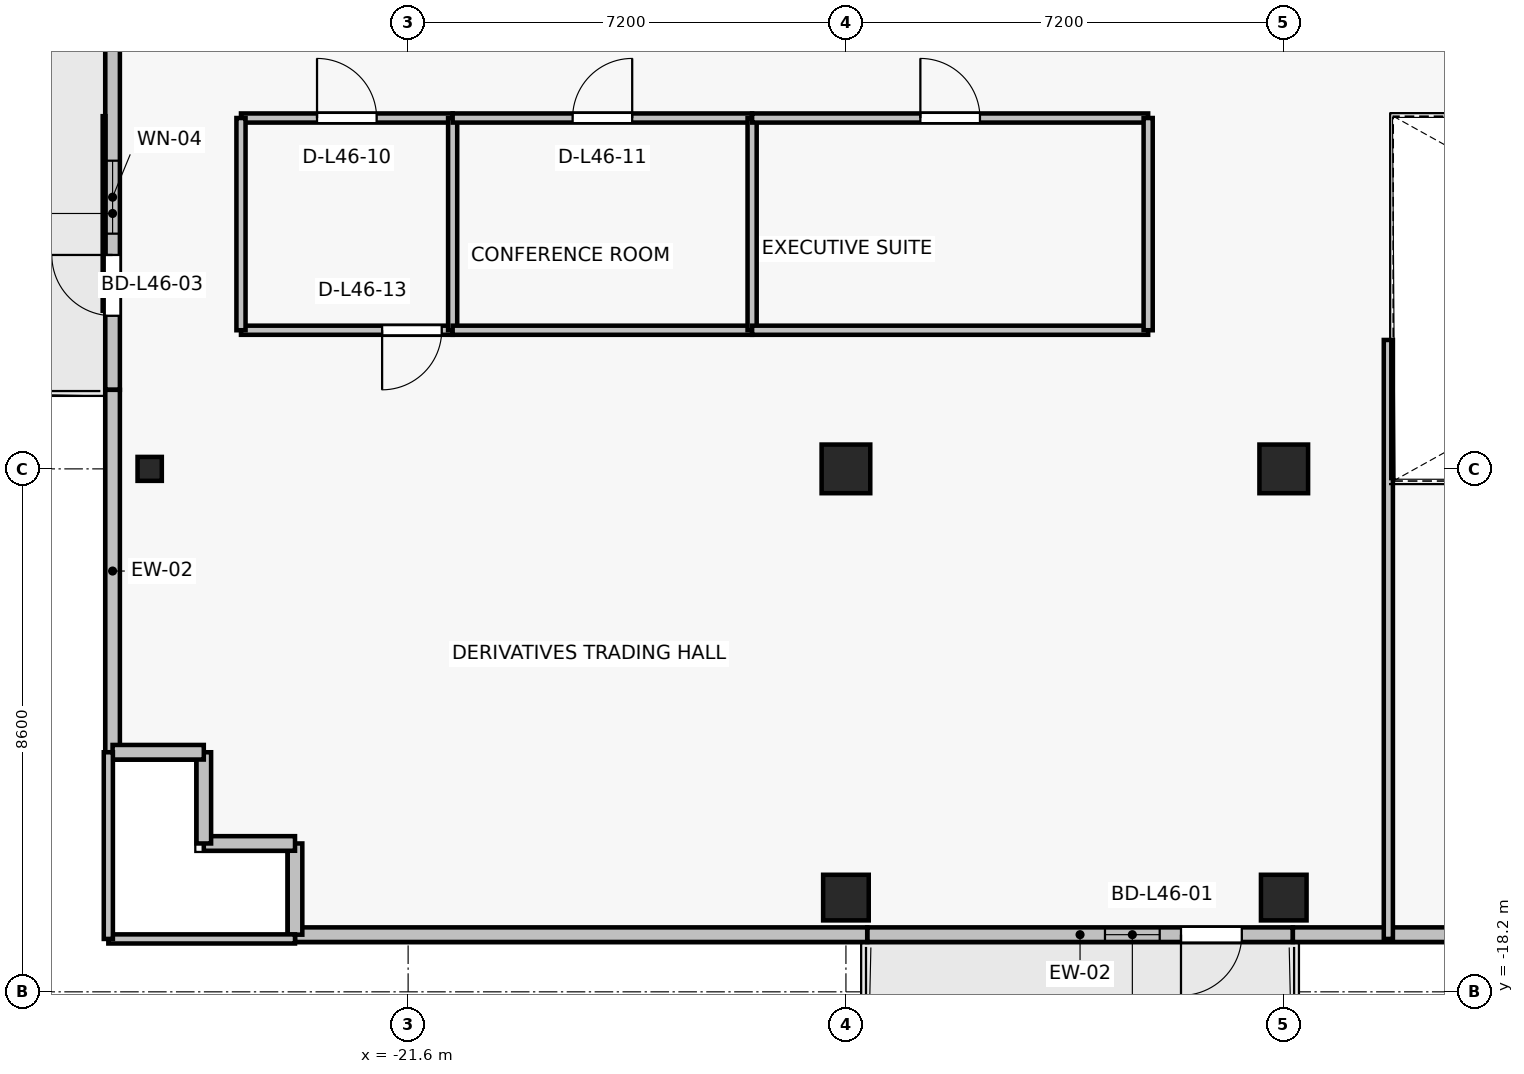
"""IFC4 building model, lengths in metres.
Left out: names, types, materials, properties, quantities, classifications, styles, units other than length and angle.
Written with IfcOpenShell. Run it as: python <this file> out.ifc"""

import sys

from ifc_helpers import new_model, si_unit, direction, frame, frame_2d, origin, origin_2d, place, context, subcontext, project, spatial, rectangle, i_section, extrude, source, transform, mapped, element, fill, save


model = new_model("IFC4")
c1 = context("Model", 3, precision=1e-05, world=origin(), true_north=direction((0.0, 1.0)))
c2 = subcontext(c1, "Body", "Model", "MODEL_VIEW")
j1 = project(units=[si_unit("LENGTHUNIT", "METRE"), si_unit("PLANEANGLEUNIT", "RADIAN")], contexts=[c1])
p1 = place(None, origin())
s1 = spatial("IfcSite", under=j1, at=p1, CompositionType="ELEMENT")
p2 = place(p1, origin())
s2 = spatial("IfcBuilding", under=s1, at=p2, CompositionType="ELEMENT")
p3 = place(p2, frame((0.0, 0.0, 166.0)))
s3 = spatial("IfcBuildingStorey", under=s2, at=p3, CompositionType="ELEMENT", Elevation=166.0)
for number, where, z_axis, x_axis in (
    (1, (-14.4, -9.6, 0.0), (0.0, 0.0, 1.0), (1.0, 0.0, 0.0)),
    (2, (-7.2, -9.6, 0.0), (0.0, 0.0, 1.0), (1.0, 0.0, 0.0)),
):
    element("IfcColumn", number, at=place(p3, frame(where, z_axis=z_axis, x_axis=x_axis)), inside=s3, PredefinedType="COLUMN", context=c2, shape_type="SweptSolid", body=[
        extrude(rectangle(XDim=0.8, YDim=0.8, at=origin_2d()), origin(), (0.0, 0.0, 1.0), 3.3),
    ])
for number, where, z_axis, x_axis in (
    (3, (-14.4, -16.65, 0.0), (0.0, 0.0, 1.0), (1.0, 0.0, 0.0)),
    (4, (-7.2, -16.65, 0.0), (0.0, 0.0, 1.0), (1.0, 0.0, 0.0)),
):
    element("IfcColumn", number, at=place(p3, frame(where, z_axis=z_axis, x_axis=x_axis)), inside=s3, PredefinedType="COLUMN", context=c2, shape_type="SweptSolid", body=[
        extrude(rectangle(XDim=0.75, YDim=0.75, at=origin_2d()), origin(), (0.0, 0.0, 1.0), 3.3),
    ])
p4 = place(p3, frame((-25.85, -9.6, 0.0), z_axis=(0.0, 0.0, 1.0), x_axis=(1.0, 0.0, 0.0)))
e5 = element("IfcColumn", 5, at=p4, inside=s3, PredefinedType="COLUMN", context=c2, shape_type="SweptSolid", body=[
    extrude(i_section(OverallWidth=0.399, OverallDepth=0.394, WebThickness=0.023, FlangeThickness=0.037, FilletRadius=0.015, at=origin_2d()), origin(), (0.0, 0.0, 1.0), 3.3),
])
p5 = place(p3, frame((-7.05, -17.26, 0.0), z_axis=(0.0, 0.0, 1.0), x_axis=(-1.0, 0.0, 0.0)))
e6 = element("IfcWall", 6, at=p5, inside=s3, PredefinedType="SOLIDWALL", context=c2, shape_type="SweptSolid", body=[
    extrude(rectangle(XDim=7.0, YDim=0.24, at=frame_2d((3.5, 0.0))), origin(), (0.0, 0.0, 1.0), 2.665),
])
p6 = place(p5, frame((0.84, 0.0, 0.0)))
e7 = element("IfcOpeningElement", 7, at=p6, cuts=e6, PredefinedType="OPENING", context=c2, shape_type="SweptSolid", body=[
    extrude(rectangle(XDim=1.0, YDim=2.2, at=frame_2d((0.5, 1.1))), frame((0.0, 0.13, 0.0), z_axis=(0.0, -1.0, 0.0), x_axis=(1.0, 0.0, 0.0)), (0.0, 0.0, 1.0), 0.26),
])
p7 = place(p5, frame((2.19, 0.0, 0.85)))
e8 = element("IfcOpeningElement", 8, at=p7, cuts=e6, PredefinedType="OPENING", context=c2, shape_type="SweptSolid", body=[
    extrude(rectangle(XDim=0.9, YDim=1.35, at=frame_2d((0.45, 0.675))), frame((0.0, 0.13, 0.0), z_axis=(0.0, -1.0, 0.0), x_axis=(1.0, 0.0, 0.0)), (0.0, 0.0, 1.0), 0.26),
])
p8 = place(p3, frame((-26.46, -8.3, 0.0), z_axis=(0.0, 0.0, 1.0), x_axis=(0.0, 1.0, 0.0)))
e9 = element("IfcWall", 9, at=p8, inside=s3, PredefinedType="SOLIDWALL", context=c2, shape_type="SweptSolid", body=[
    extrude(rectangle(XDim=5.8, YDim=0.24, at=frame_2d((2.9, 0.0))), origin(), (0.0, 0.0, 1.0), 3.075),
])
p9 = place(p8, frame((1.218, 0.0, 0.0)))
e10 = element("IfcOpeningElement", 10, at=p9, cuts=e9, PredefinedType="OPENING", context=c2, shape_type="SweptSolid", body=[
    extrude(rectangle(XDim=1.0, YDim=2.2, at=frame_2d((0.5, 1.1))), frame((0.0, 0.13, 0.0), z_axis=(0.0, -1.0, 0.0), x_axis=(1.0, 0.0, 0.0)), (0.0, 0.0, 1.0), 0.26),
])
p10 = place(p8, frame((2.568, 0.0, 0.85)))
e11 = element("IfcOpeningElement", 11, at=p10, cuts=e9, PredefinedType="OPENING", context=c2, shape_type="SweptSolid", body=[
    extrude(rectangle(XDim=1.2, YDim=1.5, at=frame_2d((0.6, 0.75))), frame((0.0, 0.13, 0.0), z_axis=(0.0, -1.0, 0.0), x_axis=(1.0, 0.0, 0.0)), (0.0, 0.0, 1.0), 0.26),
])
p11 = place(p3, frame((-26.46, -8.3, 0.0), z_axis=(0.0, 0.0, 1.0), x_axis=(0.0, -1.0, 0.0)))
e12 = element("IfcWall", 12, at=p11, inside=s3, PredefinedType="SOLIDWALL", context=c2, shape_type="SweptSolid", body=[
    extrude(rectangle(XDim=5.96, YDim=0.24, at=frame_2d((2.98, 0.0))), origin(), (0.0, 0.0, 1.0), 3.075),
])
p12 = place(p3, frame((-7.05, -17.26, 0.0), z_axis=(0.0, 0.0, 1.0), x_axis=(1.0, 0.0, 0.0)))
e13 = element("IfcWall", 13, at=p12, inside=s3, PredefinedType="SOLIDWALL", context=c2, shape_type="SweptSolid", body=[
    extrude(rectangle(XDim=3.85, YDim=0.24, at=frame_2d((1.925, 0.0))), origin(), (0.0, 0.0, 1.0), 3.075),
])
p13 = place(p3, frame((-23.46, -17.26, 0.0), z_axis=(0.0, 0.0, 1.0), x_axis=(1.0, 0.0, 0.0)))
e14 = element("IfcWall", 14, at=p13, inside=s3, PredefinedType="SOLIDWALL", context=c2, shape_type="SweptSolid", body=[
    extrude(rectangle(XDim=9.41, YDim=0.24, at=frame_2d((4.705, 0.0))), origin(), (0.0, 0.0, 1.0), 3.075),
])
for number, where, z_axis, x_axis in (
    (15, (-23.46, -15.76, 0.0), (0.0, 0.0, 1.0), (0.0, -1.0, 0.0)),
    (16, (-24.96, -15.76, 0.0), (0.0, 0.0, 1.0), (1.0, 0.0, 0.0)),
    (17, (-24.96, -14.26, 0.0), (0.0, 0.0, 1.0), (0.0, -1.0, 0.0)),
    (18, (-26.46, -14.26, 0.0), (0.0, 0.0, 1.0), (1.0, 0.0, 0.0)),
):
    element("IfcWall", number, at=place(p3, frame(where, z_axis=z_axis, x_axis=x_axis)), inside=s3, PredefinedType="SOLIDWALL", context=c2, shape_type="SweptSolid", body=[
        extrude(rectangle(XDim=1.5, YDim=0.24, at=frame_2d((0.75, 0.0))), origin(), (0.0, 0.0, 1.0), 3.075),
    ])
p14 = place(p3, frame((-20.868, -7.32, 0.0), z_axis=(0.0, 0.0, 1.0), x_axis=(-1.0, 0.0, 0.0)))
e19 = element("IfcWall", 19, at=p14, inside=s3, PredefinedType="PARTITIONING", context=c2, shape_type="SweptSolid", body=[
    extrude(rectangle(XDim=3.481, YDim=0.15, at=frame_2d((1.74, 0.0))), origin(), (0.0, 0.0, 1.0), 3.075),
])
p15 = place(p14, frame((0.18, 0.0, 0.0)))
e20 = element("IfcOpeningElement", 20, at=p15, cuts=e19, PredefinedType="OPENING", context=c2, shape_type="SweptSolid", body=[
    extrude(rectangle(XDim=0.98, YDim=2.15, at=frame_2d((0.49, 1.075))), frame((0.0, 0.085, 0.0), z_axis=(0.0, -1.0, 0.0), x_axis=(1.0, 0.0, 0.0)), (0.0, 0.0, 1.0), 0.17),
])
p16 = place(p3, frame((-24.349, -3.83, 0.0), z_axis=(0.0, 0.0, 1.0), x_axis=(1.0, 0.0, 0.0)))
e21 = element("IfcWall", 21, at=p16, inside=s3, PredefinedType="PARTITIONING", context=c2, shape_type="SweptSolid", body=[
    extrude(rectangle(XDim=3.481, YDim=0.15, at=frame_2d((1.74, 0.0))), origin(), (0.0, 0.0, 1.0), 3.075),
])
p17 = place(p16, frame((1.25, 0.0, 0.0)))
e22 = element("IfcOpeningElement", 22, at=p17, cuts=e21, PredefinedType="OPENING", context=c2, shape_type="SweptSolid", body=[
    extrude(rectangle(XDim=0.98, YDim=2.15, at=frame_2d((0.49, 1.075))), frame((0.0, 0.085, 0.0), z_axis=(0.0, -1.0, 0.0), x_axis=(1.0, 0.0, 0.0)), (0.0, 0.0, 1.0), 0.17),
])
for number, where, z_axis, x_axis in (
    (23, (-24.349, -7.32, 0.0), (0.0, 0.0, 1.0), (0.0, 1.0, 0.0)),
    (24, (-20.868, -3.83, 0.0), (0.0, 0.0, 1.0), (0.0, -1.0, 0.0)),
):
    element("IfcWall", number, at=place(p3, frame(where, z_axis=z_axis, x_axis=x_axis)), inside=s3, PredefinedType="PARTITIONING", context=c2, shape_type="SweptSolid", body=[
        extrude(rectangle(XDim=3.49, YDim=0.15, at=frame_2d((1.745, 0.0))), origin(), (0.0, 0.0, 1.0), 3.075),
    ])
p18 = place(p3, frame((-15.943, -7.32, 0.0), z_axis=(0.0, 0.0, 1.0), x_axis=(-1.0, 0.0, 0.0)))
e25 = element("IfcWall", 25, at=p18, inside=s3, PredefinedType="PARTITIONING", context=c2, shape_type="SweptSolid", body=[
    extrude(rectangle(XDim=4.925, YDim=0.15, at=frame_2d((2.462, 0.0))), origin(), (0.0, 0.0, 1.0), 3.075),
])
p19 = place(p3, frame((-20.868, -3.83, 0.0), z_axis=(0.0, 0.0, 1.0), x_axis=(1.0, 0.0, 0.0)))
e26 = element("IfcWall", 26, at=p19, inside=s3, PredefinedType="PARTITIONING", context=c2, shape_type="SweptSolid", body=[
    extrude(rectangle(XDim=4.925, YDim=0.15, at=frame_2d((2.462, 0.0))), origin(), (0.0, 0.0, 1.0), 3.075),
])
p20 = place(p19, frame((1.973, 0.0, 0.0)))
e27 = element("IfcOpeningElement", 27, at=p20, cuts=e26, PredefinedType="OPENING", context=c2, shape_type="SweptSolid", body=[
    extrude(rectangle(XDim=0.98, YDim=2.15, at=frame_2d((0.49, 1.075))), frame((0.0, 0.085, 0.0), z_axis=(0.0, -1.0, 0.0), x_axis=(1.0, 0.0, 0.0)), (0.0, 0.0, 1.0), 0.17),
])
p21 = place(p3, frame((-15.943, -3.83, 0.0), z_axis=(0.0, 0.0, 1.0), x_axis=(0.0, -1.0, 0.0)))
e28 = element("IfcWall", 28, at=p21, inside=s3, PredefinedType="PARTITIONING", context=c2, shape_type="SweptSolid", body=[
    extrude(rectangle(XDim=3.49, YDim=0.15, at=frame_2d((1.745, 0.0))), origin(), (0.0, 0.0, 1.0), 3.075),
])
p22 = place(p3, frame((-9.43, -7.32, 0.0), z_axis=(0.0, 0.0, 1.0), x_axis=(-1.0, 0.0, 0.0)))
e29 = element("IfcWall", 29, at=p22, inside=s3, PredefinedType="PARTITIONING", context=c2, shape_type="SweptSolid", body=[
    extrude(rectangle(XDim=6.513, YDim=0.15, at=frame_2d((3.257, 0.0))), origin(), (0.0, 0.0, 1.0), 2.565),
])
p23 = place(p3, frame((-15.943, -3.83, 0.0), z_axis=(0.0, 0.0, 1.0), x_axis=(1.0, 0.0, 0.0)))
e30 = element("IfcWall", 30, at=p23, inside=s3, PredefinedType="PARTITIONING", context=c2, shape_type="SweptSolid", body=[
    extrude(rectangle(XDim=6.513, YDim=0.15, at=frame_2d((3.257, 0.0))), origin(), (0.0, 0.0, 1.0), 2.565),
])
p24 = place(p23, frame((2.767, 0.0, 0.0)))
e31 = element("IfcOpeningElement", 31, at=p24, cuts=e30, PredefinedType="OPENING", context=c2, shape_type="SweptSolid", body=[
    extrude(rectangle(XDim=0.98, YDim=2.15, at=frame_2d((0.49, 1.075))), frame((0.0, 0.085, 0.0), z_axis=(0.0, -1.0, 0.0), x_axis=(1.0, 0.0, 0.0)), (0.0, 0.0, 1.0), 0.17),
])
p25 = place(p3, frame((-9.43, -3.83, 0.0), z_axis=(0.0, 0.0, 1.0), x_axis=(0.0, -1.0, 0.0)))
e32 = element("IfcWall", 32, at=p25, inside=s3, PredefinedType="PARTITIONING", context=c2, shape_type="SweptSolid", body=[
    extrude(rectangle(XDim=3.49, YDim=0.15, at=frame_2d((1.745, 0.0))), origin(), (0.0, 0.0, 1.0), 2.665),
])
p26 = place(p3, frame((-23.46, -17.33, 0.0), z_axis=(0.0, 0.0, 1.0), x_axis=(-1.0, 0.0, 0.0)))
e33 = element("IfcWall", 33, at=p26, inside=s3, PredefinedType="PARTITIONING", context=c2, shape_type="SweptSolid", body=[
    extrude(rectangle(XDim=3.07, YDim=0.15, at=frame_2d((1.535, 0.0))), origin(), (0.0, 0.0, 1.0), 2.665),
])
p27 = place(p3, frame((-26.53, -17.33, 0.0), z_axis=(0.0, 0.0, 1.0), x_axis=(0.0, 1.0, 0.0)))
e34 = element("IfcWall", 34, at=p27, inside=s3, PredefinedType="PARTITIONING", context=c2, shape_type="SweptSolid", body=[
    extrude(rectangle(XDim=3.07, YDim=0.15, at=frame_2d((1.535, 0.0))), origin(), (0.0, 0.0, 1.0), 3.075),
])
p28 = place(p3, frame((-5.48, -7.48, 0.0), z_axis=(0.0, 0.0, 1.0), x_axis=(0.0, -1.0, 0.0)))
e35 = element("IfcWall", 35, at=p28, inside=s3, PredefinedType="PARTITIONING", context=c2, shape_type="SweptSolid", body=[
    extrude(rectangle(XDim=9.85, YDim=0.15, at=frame_2d((4.925, 0.0))), origin(), (0.0, 0.0, 1.0), 2.565),
])
m1 = source(origin(), c2, "Body", "SweptSolid", [
    extrude(rectangle(XDim=1.0, YDim=2.2, at=frame_2d((0.5, 1.1))), frame((0.0, 0.025, 0.0), z_axis=(0.0, -1.0, 0.0), x_axis=(1.0, 0.0, 0.0)), (0.0, 0.0, 1.0), 0.05),
])
p29 = place(p6, origin())
e36 = element("IfcDoor", 36, at=p29, inside=s3, OperationType="SINGLE_SWING_RIGHT", PredefinedType="DOOR", context=c2, shape_type="MappedRepresentation", body=[
    mapped(m1, transform((0.0, 0.0, 0.0), x_axis=(1.0, 0.0, 0.0), y_axis=(0.0, 1.0, 0.0), z_axis=(0.0, 0.0, 1.0), scale=1.0)),
])
fill(e7, e36)
m2 = source(origin(), c2, "Body", "SweptSolid", [
    extrude(rectangle(XDim=0.9, YDim=1.35, at=frame_2d((0.45, 0.675))), frame((0.0, 0.03, 0.0), z_axis=(0.0, -1.0, 0.0), x_axis=(1.0, 0.0, 0.0)), (0.0, 0.0, 1.0), 0.06),
])
p30 = place(p7, origin())
e37 = element("IfcWindow", 37, at=p30, inside=s3, PartitioningType="SINGLE_PANEL", PredefinedType="WINDOW", context=c2, shape_type="MappedRepresentation", body=[
    mapped(m2, transform((0.0, 0.0, 0.0), x_axis=(1.0, 0.0, 0.0), y_axis=(0.0, 1.0, 0.0), z_axis=(0.0, 0.0, 1.0), scale=1.0)),
])
fill(e8, e37)
p31 = place(p9, origin())
e38 = element("IfcDoor", 38, at=p31, inside=s3, OperationType="SINGLE_SWING_RIGHT", PredefinedType="DOOR", context=c2, shape_type="MappedRepresentation", body=[
    mapped(m1, transform((0.0, 0.0, 0.0), x_axis=(1.0, 0.0, 0.0), y_axis=(0.0, 1.0, 0.0), z_axis=(0.0, 0.0, 1.0), scale=1.0)),
])
fill(e10, e38)
m3 = source(origin(), c2, "Body", "SweptSolid", [
    extrude(rectangle(XDim=1.2, YDim=1.5, at=frame_2d((0.6, 0.75))), frame((0.0, 0.03, 0.0), z_axis=(0.0, -1.0, 0.0), x_axis=(1.0, 0.0, 0.0)), (0.0, 0.0, 1.0), 0.06),
])
p32 = place(p10, origin())
e39 = element("IfcWindow", 39, at=p32, inside=s3, PartitioningType="SINGLE_PANEL", PredefinedType="WINDOW", context=c2, shape_type="MappedRepresentation", body=[
    mapped(m3, transform((0.0, 0.0, 0.0), x_axis=(1.0, 0.0, 0.0), y_axis=(0.0, 1.0, 0.0), z_axis=(0.0, 0.0, 1.0), scale=1.0)),
])
fill(e11, e39)
m4 = source(origin(), c2, "Body", "SweptSolid", [
    extrude(rectangle(XDim=0.98, YDim=2.15, at=frame_2d((0.49, 1.075))), frame((0.0, 0.025, 0.0), z_axis=(0.0, -1.0, 0.0), x_axis=(1.0, 0.0, 0.0)), (0.0, 0.0, 1.0), 0.05),
])
p33 = place(p17, origin())
e40 = element("IfcDoor", 40, at=p33, inside=s3, OperationType="SINGLE_SWING_LEFT", PredefinedType="DOOR", context=c2, shape_type="MappedRepresentation", body=[
    mapped(m4, transform((0.0, 0.0, 0.0), x_axis=(1.0, 0.0, 0.0), y_axis=(0.0, 1.0, 0.0), z_axis=(0.0, 0.0, 1.0), scale=1.0)),
])
fill(e22, e40)
p34 = place(p20, origin())
e41 = element("IfcDoor", 41, at=p34, inside=s3, OperationType="SINGLE_SWING_RIGHT", PredefinedType="DOOR", context=c2, shape_type="MappedRepresentation", body=[
    mapped(m4, transform((0.0, 0.0, 0.0), x_axis=(1.0, 0.0, 0.0), y_axis=(0.0, 1.0, 0.0), z_axis=(0.0, 0.0, 1.0), scale=1.0)),
])
fill(e27, e41)
p35 = place(p24, origin())
e42 = element("IfcDoor", 42, at=p35, inside=s3, OperationType="SINGLE_SWING_LEFT", PredefinedType="DOOR", context=c2, shape_type="MappedRepresentation", body=[
    mapped(m4, transform((0.0, 0.0, 0.0), x_axis=(1.0, 0.0, 0.0), y_axis=(0.0, 1.0, 0.0), z_axis=(0.0, 0.0, 1.0), scale=1.0)),
])
fill(e31, e42)
p36 = place(p15, origin())
e43 = element("IfcDoor", 43, at=p36, inside=s3, OperationType="SINGLE_SWING_RIGHT", PredefinedType="DOOR", context=c2, shape_type="MappedRepresentation", body=[
    mapped(m4, transform((0.0, 0.0, 0.0), x_axis=(1.0, 0.0, 0.0), y_axis=(0.0, 1.0, 0.0), z_axis=(0.0, 0.0, 1.0), scale=1.0)),
])
fill(e20, e43)
save(model, sys.argv[1])
